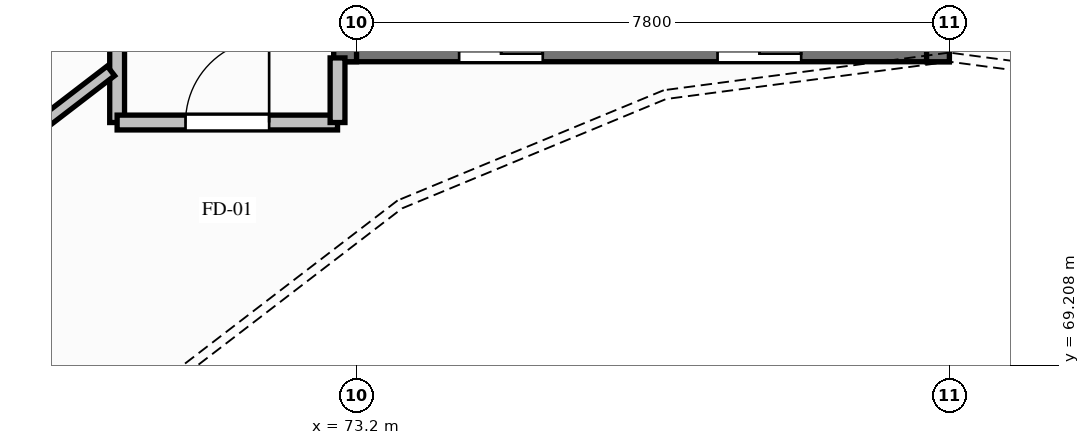
"""IFC4 building model, lengths in metres.
Left out: names, types, materials, properties, quantities, classifications, styles, units other than length and angle.
Written with IfcOpenShell. Run it as: python <this file> out.ifc"""

import sys

from ifc_helpers import new_model, si_unit, direction, frame, frame_2d, origin, place, context, subcontext, project, spatial, rectangle, extrude, element, fill, save


model = new_model("IFC4")
c1 = context("Model", 3, precision=1e-05, world=origin(), true_north=direction((0.0, 1.0)))
c2 = subcontext(c1, "Body", "Model", "MODEL_VIEW")
j1 = project(units=[si_unit("LENGTHUNIT", "METRE"), si_unit("PLANEANGLEUNIT", "RADIAN")], contexts=[c1])
p1 = place(None, origin())
s1 = spatial("IfcSite", under=j1, at=p1, CompositionType="ELEMENT")
p2 = place(p1, origin())
s2 = spatial("IfcBuilding", under=s1, at=p2, CompositionType="ELEMENT")
p3 = place(p2, frame((0.0, 0.0, 17.25)))
s3 = spatial("IfcBuildingStorey", under=s2, at=p3, CompositionType="ELEMENT", Elevation=17.25)
p4 = place(p3, frame((72.9, 73.35, 0.0), z_axis=(0.0, 0.0, 1.0), x_axis=(1.0, 0.0, 0.0)))
e1 = element("IfcWall", 1, at=p4, inside=s3, PredefinedType="SHEAR", context=c2, shape_type="SweptSolid", body=[
    extrude(rectangle(XDim=8.1, YDim=0.3, at=frame_2d((4.05, 0.0))), origin(), (0.0, 0.0, 1.0), 4.05),
])
p5 = place(p4, frame((1.65, 0.0, 0.0)))
e2 = element("IfcOpeningElement", 2, at=p5, cuts=e1, PredefinedType="OPENING", context=c2, shape_type="SweptSolid", body=[
    extrude(rectangle(XDim=1.1, YDim=2.1, at=frame_2d((0.55, 1.05))), frame((0.0, 0.16, 0.0), z_axis=(0.0, -1.0, 0.0), x_axis=(1.0, 0.0, 0.0)), (0.0, 0.0, 1.0), 0.32),
])
p6 = place(p4, frame((5.05, 0.0, 0.0)))
e3 = element("IfcOpeningElement", 3, at=p6, cuts=e1, PredefinedType="OPENING", context=c2, shape_type="SweptSolid", body=[
    extrude(rectangle(XDim=1.1, YDim=2.1, at=frame_2d((0.55, 1.05))), frame((0.0, 0.16, 0.0), z_axis=(0.0, -1.0, 0.0), x_axis=(1.0, 0.0, 0.0)), (0.0, 0.0, 1.0), 0.32),
])
p7 = place(p3, frame((73.05, 73.2, 0.0), z_axis=(0.0, 0.0, 1.0), x_axis=(0.0, 1.0, 0.0)))
e4 = element("IfcWall", 4, at=p7, inside=s3, PredefinedType="SHEAR", context=c2, shape_type="SweptSolid", body=[
    extrude(rectangle(XDim=7.2, YDim=0.3, at=frame_2d((3.6, 0.0))), origin(), (0.0, 0.0, 1.0), 4.05),
])
p8 = place(p7, frame((4.2, 0.0, 0.0)))
e5 = element("IfcOpeningElement", 5, at=p8, cuts=e4, PredefinedType="OPENING", context=c2, shape_type="SweptSolid", body=[
    extrude(rectangle(XDim=1.1, YDim=2.15, at=frame_2d((0.55, 1.075))), frame((0.0, 0.16, 0.0), z_axis=(0.0, -1.0, 0.0), x_axis=(1.0, 0.0, 0.0)), (0.0, 0.0, 1.0), 0.32),
])
p9 = place(p3, frame((80.85, 73.2, 0.0), z_axis=(0.0, 0.0, 1.0), x_axis=(0.0, 1.0, 0.0)))
e6 = element("IfcWall", 6, at=p9, inside=s3, PredefinedType="SHEAR", context=c2, shape_type="SweptSolid", body=[
    extrude(rectangle(XDim=7.2, YDim=0.3, at=frame_2d((3.6, 0.0))), origin(), (0.0, 0.0, 1.0), 4.05),
])
p10 = place(p3, frame((70.05, 72.4, 0.0), z_axis=(0.0, 0.0, 1.0), x_axis=(0.0, 1.0, 0.0)))
e7 = element("IfcWall", 7, at=p10, inside=s3, PredefinedType="PARTITIONING", context=c2, shape_type="SweptSolid", body=[
    extrude(rectangle(XDim=7.95, YDim=0.195, at=frame_2d((3.975, 0.0))), origin(), (0.0, 0.0, 1.0), 3.528),
])
p11 = place(p3, frame((70.05, 72.4, 0.0), z_axis=(0.0, 0.0, 1.0), x_axis=(1.0, 0.0, 0.0)))
e8 = element("IfcWall", 8, at=p11, inside=s3, PredefinedType="PARTITIONING", context=c2, shape_type="SweptSolid", body=[
    extrude(rectangle(XDim=2.9, YDim=0.195, at=frame_2d((1.45, 0.0))), origin(), (0.0, 0.0, 1.0), 3.78),
])
p12 = place(p11, frame((0.9, 0.0, 0.0)))
e9 = element("IfcOpeningElement", 9, at=p12, cuts=e8, PredefinedType="OPENING", context=c2, shape_type="SweptSolid", body=[
    extrude(rectangle(XDim=1.1, YDim=2.15, at=frame_2d((0.55, 1.075))), frame((0.0, 0.107, 0.0), z_axis=(0.0, -1.0, 0.0), x_axis=(1.0, 0.0, 0.0)), (0.0, 0.0, 1.0), 0.215),
])
p13 = place(p3, frame((72.95, 72.4, 0.0), z_axis=(0.0, 0.0, 1.0), x_axis=(0.0, 1.0, 0.0)))
e10 = element("IfcWall", 10, at=p13, inside=s3, PredefinedType="PARTITIONING", context=c2, shape_type="SweptSolid", body=[
    extrude(rectangle(XDim=0.85, YDim=0.195, at=frame_2d((0.425, 0.0))), origin(), (0.0, 0.0, 1.0), 3.78),
])
p14 = place(p3, frame((69.969, 73.079, 0.0), z_axis=(0.0, 0.0, 1.0), x_axis=(-0.7933756116, -0.608732403374, 0.0)))
e11 = element("IfcWall", 11, at=p14, inside=s3, PredefinedType="PARTITIONING", context=c2, shape_type="SweptSolid", body=[
    extrude(rectangle(XDim=2.317, YDim=0.16, at=frame_2d((1.158, 0.0))), origin(), (0.0, 0.0, 1.0), 3.78),
])
p15 = place(p12, origin())
e12 = element("IfcDoor", 12, at=p15, inside=s3, OperationType="SINGLE_SWING_RIGHT", PredefinedType="DOOR", context=c2, shape_type="SweptSolid", body=[
    extrude(rectangle(XDim=1.1, YDim=2.15, at=frame_2d((0.55, 1.075))), frame((0.0, 0.025, 0.0), z_axis=(0.0, -1.0, 0.0), x_axis=(1.0, 0.0, 0.0)), (0.0, 0.0, 1.0), 0.05),
])
fill(e9, e12)
save(model, sys.argv[1])
